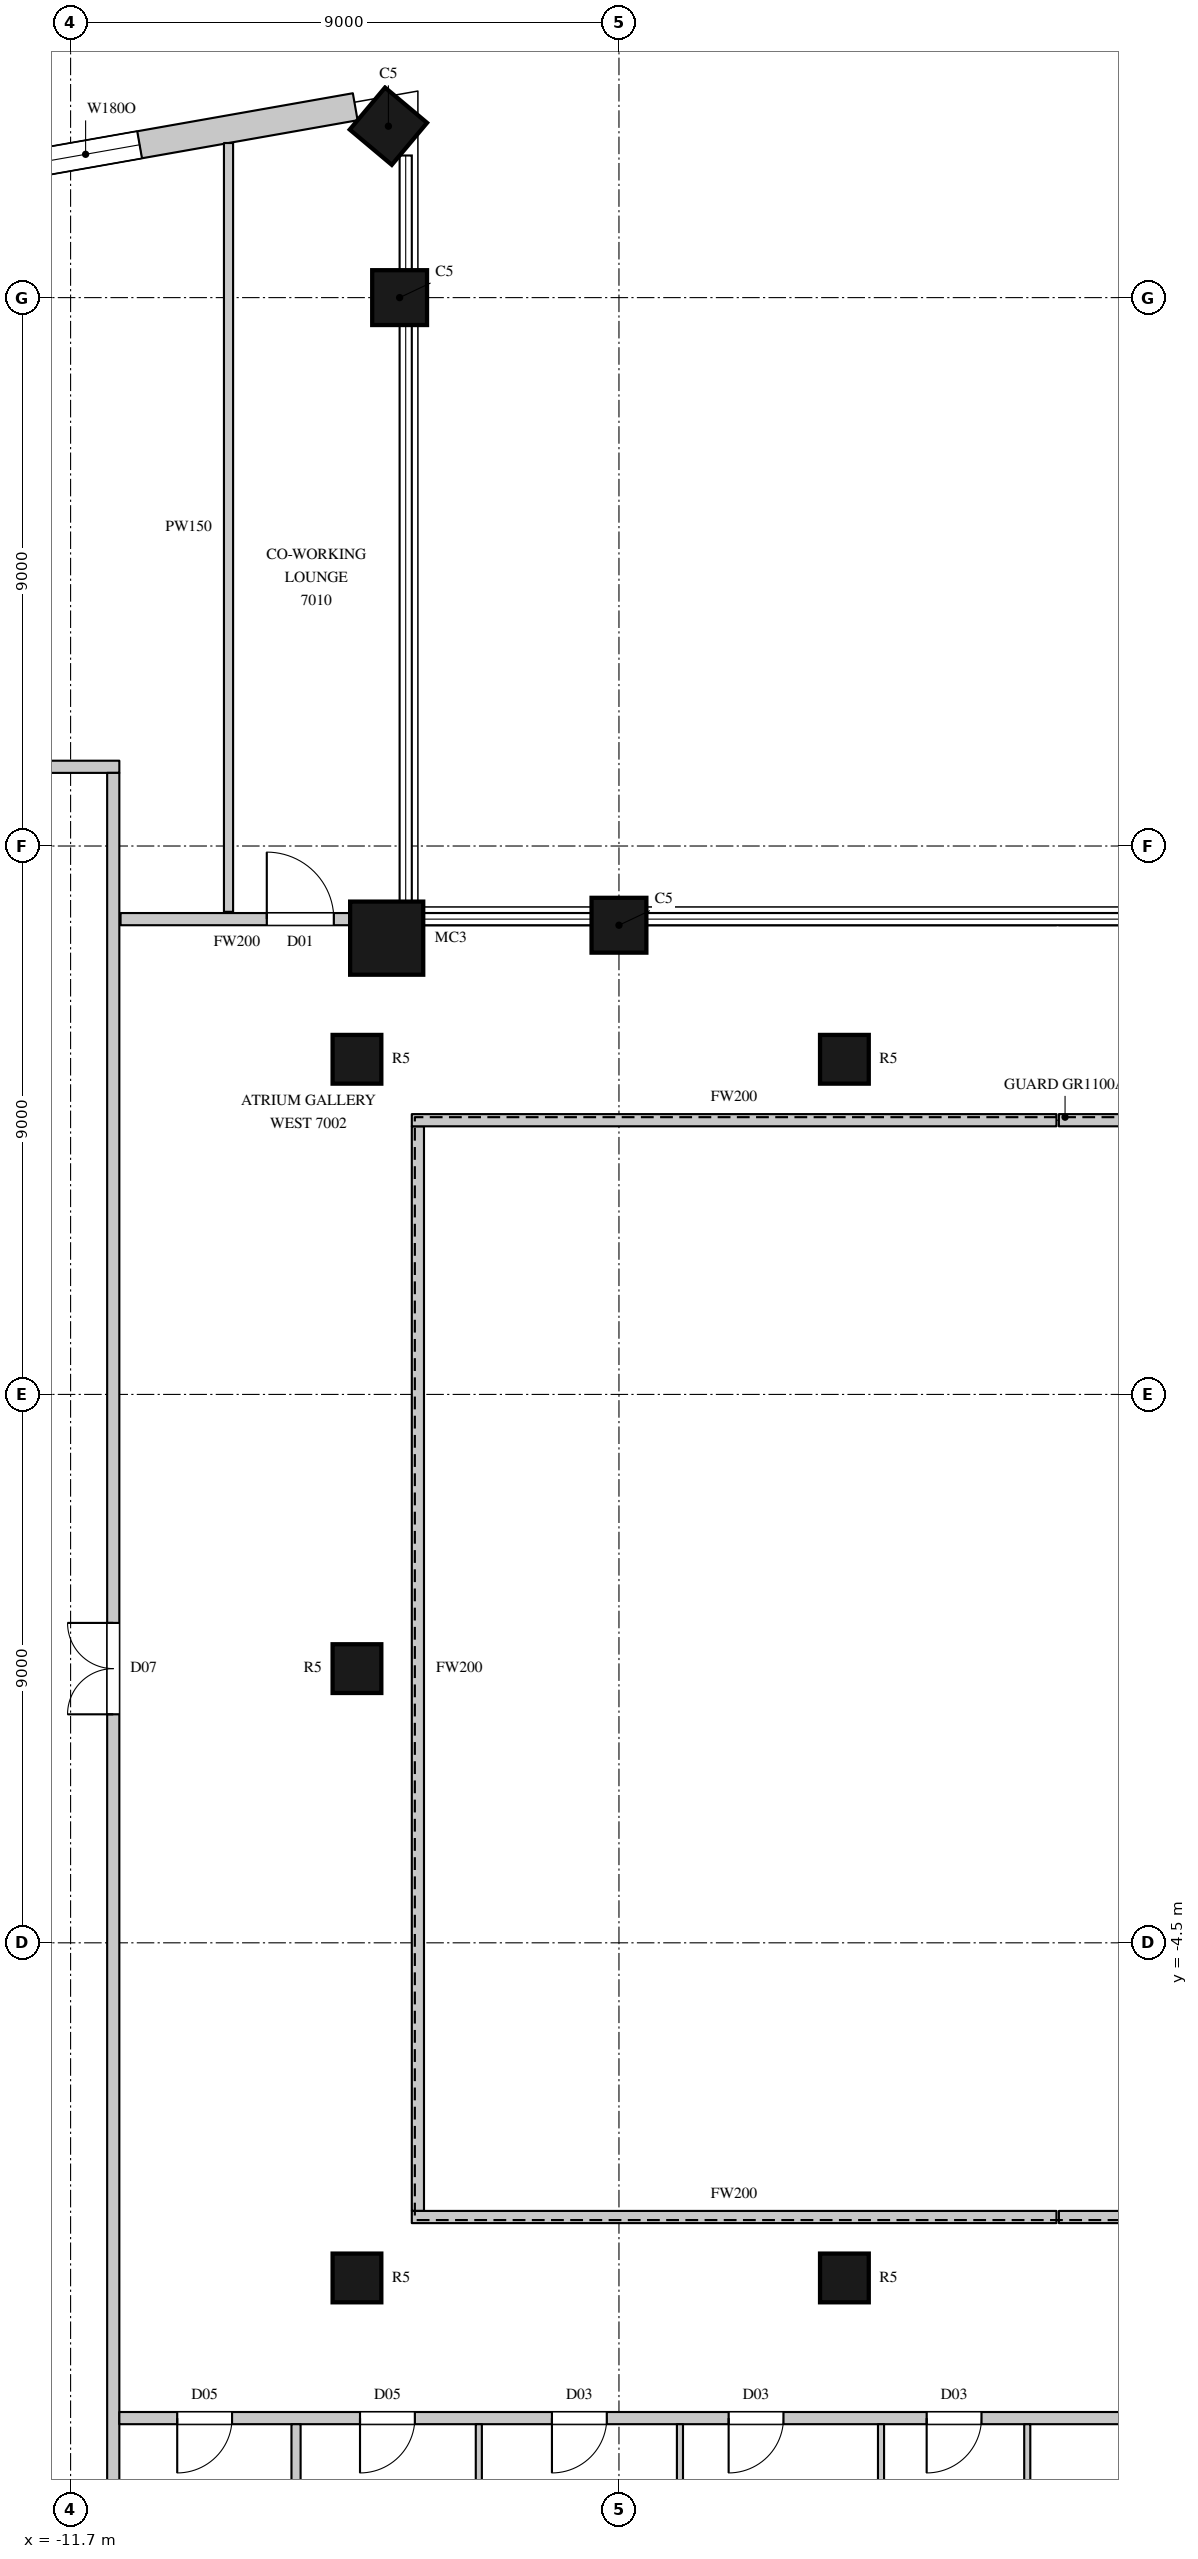
"""IFC4 building model, lengths in metres.
Left out: names, types, materials, properties, quantities, classifications, styles, units other than length and angle.
Written with IfcOpenShell. Run it as: python <this file> out.ifc"""

import sys

from ifc_helpers import new_model, si_unit, direction, frame, frame_2d, origin, origin_2d, place, context, subcontext, project, spatial, rectangle, circle, extrude, element, fill, save


model = new_model("IFC4")
c1 = context("Model", 3, precision=1e-05, world=origin(), true_north=direction((0.0, 1.0)))
c2 = subcontext(c1, "Body", "Model", "MODEL_VIEW")
j1 = project(units=[si_unit("LENGTHUNIT", "METRE"), si_unit("PLANEANGLEUNIT", "RADIAN")], contexts=[c1])
p1 = place(None, origin())
s1 = spatial("IfcSite", under=j1, at=p1, CompositionType="ELEMENT")
p2 = place(p1, origin())
s2 = spatial("IfcBuilding", under=s1, at=p2, CompositionType="ELEMENT")
p3 = place(p2, frame((0.0, 0.0, 309.0)))
s3 = spatial("IfcBuildingStorey", under=s2, at=p3, CompositionType="ELEMENT", Elevation=309.0)
p4 = place(p3, frame((-2.7, 12.2, 0.0), z_axis=(0.0, 0.0, 1.0), x_axis=(-1.0, 0.0, 0.0)))
e1 = element("IfcColumn", 1, at=p4, inside=s3, PredefinedType="COLUMN", context=c2, shape_type="SweptSolid", body=[
    extrude(rectangle(XDim=0.9, YDim=0.9, at=origin_2d()), origin(), (0.0, 0.0, 1.0), 4.1),
])
p5 = place(p3, frame((-6.512, 11.988, 0.0), z_axis=(0.0, 0.0, 1.0), x_axis=(1.0, 0.0, 0.0)))
e2 = element("IfcColumn", 2, at=p5, inside=s3, PredefinedType="COLUMN", context=c2, shape_type="SweptSolid", body=[
    extrude(circle(Radius=0.6, at=origin_2d()), origin(), (0.0, 0.0, 1.0), 4.1),
])
for number, where, z_axis, x_axis in (
    (3, (-6.3, 22.5, 0.0), (0.0, 0.0, 1.0), (0.0, 1.0, 0.0)),
    (4, (-6.484, 25.313, 0.0), (0.0, 0.0, 1.0), (-0.766, 0.643, 0.0)),
):
    element("IfcColumn", number, at=place(p3, frame(where, z_axis=z_axis, x_axis=x_axis)), inside=s3, PredefinedType="COLUMN", context=c2, shape_type="SweptSolid", body=[
        extrude(rectangle(XDim=0.9, YDim=0.9, at=origin_2d()), origin(), (0.0, 0.0, 1.0), 4.1),
    ])
for number, where, z_axis, x_axis in (
    (5, (-7.0, -10.0, 0.0), (0.0, 0.0, 1.0), (1.0, 0.0, 0.0)),
    (6, (-7.0, 0.0, 0.0), (0.0, 0.0, 1.0), (1.0, 0.0, 0.0)),
    (7, (-7.0, 10.0, 0.0), (0.0, 0.0, 1.0), (1.0, 0.0, 0.0)),
    (8, (1.0, -10.0, 0.0), (0.0, 0.0, 1.0), (1.0, 0.0, 0.0)),
    (9, (1.0, 10.0, 0.0), (0.0, 0.0, 1.0), (1.0, 0.0, 0.0)),
):
    element("IfcColumn", number, at=place(p3, frame(where, z_axis=z_axis, x_axis=x_axis)), inside=s3, PredefinedType="COLUMN", context=c2, shape_type="SweptSolid", body=[
        extrude(circle(Radius=0.4, at=origin_2d()), origin(), (0.0, 0.0, 1.0), 4.1),
    ])
p6 = place(p3, frame((-7.029, 25.632, 0.0), z_axis=(0.0, 0.0, 1.0), x_axis=(-0.984797606634, -0.173705710808, 0.0)))
e10 = element("IfcWall", 10, at=p6, inside=s3, PredefinedType="SOLIDWALL", context=c2, shape_type="SweptSolid", body=[
    extrude(rectangle(XDim=5.772, YDim=0.45, at=frame_2d((2.886, 0.0))), origin(), (0.0, 0.0, 1.0), 3.8),
])
p7 = place(p6, frame((3.593, 0.0, 1.05)))
e11 = element("IfcOpeningElement", 11, at=p7, cuts=e10, PredefinedType="OPENING", context=c2, shape_type="SweptSolid", body=[
    extrude(rectangle(XDim=1.8, YDim=2.4, at=frame_2d((0.9, 1.2))), frame((0.0, 0.235, 0.0), z_axis=(0.0, -1.0, 0.0), x_axis=(1.0, 0.0, 0.0)), (0.0, 0.0, 1.0), 0.47),
])
p8 = place(p3, frame((-13.97, 14.8, 0.0), z_axis=(0.0, 0.0, 1.0), x_axis=(1.0, 0.0, 0.0)))
e12 = element("IfcWall", 12, at=p8, inside=s3, PredefinedType="PARTITIONING", context=c2, shape_type="SweptSolid", body=[
    extrude(rectangle(XDim=3.07, YDim=0.2, at=frame_2d((1.535, 0.0))), origin(), (0.0, 0.0, 1.0), 3.8),
])
p9 = place(p3, frame((-11.0, -14.8, 0.0), z_axis=(0.0, 0.0, 1.0), x_axis=(0.0, 1.0, 0.0)))
e13 = element("IfcWall", 13, at=p9, inside=s3, PredefinedType="PARTITIONING", context=c2, shape_type="SweptSolid", body=[
    extrude(rectangle(XDim=29.5, YDim=0.2, at=frame_2d((14.75, 0.0))), origin(), (0.0, 0.0, 1.0), 3.8),
])
p10 = place(p9, frame((14.05, 0.0, 0.0)))
e14 = element("IfcOpeningElement", 14, at=p10, cuts=e13, PredefinedType="OPENING", context=c2, shape_type="SweptSolid", body=[
    extrude(rectangle(XDim=1.5, YDim=2.4, at=frame_2d((0.75, 1.2))), frame((0.0, 0.11, 0.0), z_axis=(0.0, -1.0, 0.0), x_axis=(1.0, 0.0, 0.0)), (0.0, 0.0, 1.0), 0.22),
])
p11 = place(p3, frame((-10.9, -12.3, 0.0), z_axis=(0.0, 0.0, 1.0), x_axis=(1.0, 0.0, 0.0)))
e15 = element("IfcWall", 15, at=p11, inside=s3, PredefinedType="PARTITIONING", context=c2, shape_type="SweptSolid", body=[
    extrude(rectangle(XDim=22.1, YDim=0.2, at=frame_2d((11.05, 0.0))), origin(), (0.0, 0.0, 1.0), 3.8),
])
p12 = place(p11, frame((0.95, 0.0, 0.0)))
e16 = element("IfcOpeningElement", 16, at=p12, cuts=e15, PredefinedType="OPENING", context=c2, shape_type="SweptSolid", body=[
    extrude(rectangle(XDim=0.9, YDim=2.2, at=frame_2d((0.45, 1.1))), frame((0.0, 0.11, 0.0), z_axis=(0.0, -1.0, 0.0), x_axis=(1.0, 0.0, 0.0)), (0.0, 0.0, 1.0), 0.22),
])
p13 = place(p11, frame((3.95, 0.0, 0.0)))
e17 = element("IfcOpeningElement", 17, at=p13, cuts=e15, PredefinedType="OPENING", context=c2, shape_type="SweptSolid", body=[
    extrude(rectangle(XDim=0.9, YDim=2.2, at=frame_2d((0.45, 1.1))), frame((0.0, 0.11, 0.0), z_axis=(0.0, -1.0, 0.0), x_axis=(1.0, 0.0, 0.0)), (0.0, 0.0, 1.0), 0.22),
])
p14 = place(p11, frame((7.1, 0.0, 0.0)))
e18 = element("IfcOpeningElement", 18, at=p14, cuts=e15, PredefinedType="OPENING", context=c2, shape_type="SweptSolid", body=[
    extrude(rectangle(XDim=0.9, YDim=2.2, at=frame_2d((0.45, 1.1))), frame((0.0, 0.11, 0.0), z_axis=(0.0, -1.0, 0.0), x_axis=(1.0, 0.0, 0.0)), (0.0, 0.0, 1.0), 0.22),
])
p15 = place(p11, frame((10.0, 0.0, 0.0)))
e19 = element("IfcOpeningElement", 19, at=p15, cuts=e15, PredefinedType="OPENING", context=c2, shape_type="SweptSolid", body=[
    extrude(rectangle(XDim=0.9, YDim=2.2, at=frame_2d((0.45, 1.1))), frame((0.0, 0.11, 0.0), z_axis=(0.0, -1.0, 0.0), x_axis=(1.0, 0.0, 0.0)), (0.0, 0.0, 1.0), 0.22),
])
p16 = place(p11, frame((13.25, 0.0, 0.0)))
e20 = element("IfcOpeningElement", 20, at=p16, cuts=e15, PredefinedType="OPENING", context=c2, shape_type="SweptSolid", body=[
    extrude(rectangle(XDim=0.9, YDim=2.2, at=frame_2d((0.45, 1.1))), frame((0.0, 0.11, 0.0), z_axis=(0.0, -1.0, 0.0), x_axis=(1.0, 0.0, 0.0)), (0.0, 0.0, 1.0), 0.22),
])
p17 = place(p11, frame((16.85, 0.0, 0.0)))
e21 = element("IfcOpeningElement", 21, at=p17, cuts=e15, PredefinedType="OPENING", context=c2, shape_type="SweptSolid", body=[
    extrude(rectangle(XDim=1.1, YDim=2.4, at=frame_2d((0.55, 1.2))), frame((0.0, 0.11, 0.0), z_axis=(0.0, -1.0, 0.0), x_axis=(1.0, 0.0, 0.0)), (0.0, 0.0, 1.0), 0.22),
])
p18 = place(p3, frame((-10.88, 12.3, 0.0), z_axis=(0.0, 0.0, 1.0), x_axis=(1.0, 0.0, 0.0)))
e22 = element("IfcWall", 22, at=p18, inside=s3, PredefinedType="PARTITIONING", context=c2, shape_type="SweptSolid", body=[
    extrude(rectangle(XDim=3.818, YDim=0.2, at=frame_2d((1.909, 0.0))), origin(), (0.0, 0.0, 1.0), 3.8),
])
p19 = place(p18, frame((2.4, 0.0, 0.0)))
e23 = element("IfcOpeningElement", 23, at=p19, cuts=e22, PredefinedType="OPENING", context=c2, shape_type="SweptSolid", body=[
    extrude(rectangle(XDim=1.1, YDim=2.4, at=frame_2d((0.55, 1.2))), frame((0.0, 0.11, 0.0), z_axis=(0.0, -1.0, 0.0), x_axis=(1.0, 0.0, 0.0)), (0.0, 0.0, 1.0), 0.22),
])
p20 = place(p3, frame((-5.962, 12.3, 0.0), z_axis=(0.0, 0.0, 1.0), x_axis=(1.0, 0.0, 0.0)))
e24 = element("IfcWall", 24, at=p20, inside=s3, PredefinedType="PARTITIONING", context=c2, shape_type="SweptSolid", body=[
    extrude(rectangle(XDim=2.812, YDim=0.2, at=frame_2d((1.406, 0.0))), origin(), (0.0, 0.0, 1.0), 3.8),
])
p21 = place(p3, frame((-2.25, 12.3, 0.0), z_axis=(0.0, 0.0, 1.0), x_axis=(1.0, 0.0, 0.0)))
e25 = element("IfcWall", 25, at=p21, inside=s3, PredefinedType="PARTITIONING", context=c2, shape_type="SweptSolid", body=[
    extrude(rectangle(XDim=6.73, YDim=0.2, at=frame_2d((3.365, 0.0))), origin(), (0.0, 0.0, 1.0), 3.8),
])
p22 = place(p3, frame((-6.0, -8.9, 0.0), z_axis=(0.0, 0.0, 1.0), x_axis=(0.0, 1.0, 0.0)))
e26 = element("IfcWall", 26, at=p22, inside=s3, PredefinedType="PARTITIONING", context=c2, shape_type="SweptSolid", body=[
    extrude(rectangle(XDim=17.8, YDim=0.2, at=frame_2d((8.9, 0.0))), origin(), (0.0, 0.0, 1.0), 3.8),
])
for number, where, z_axis, x_axis in (
    (27, (-6.1, -9.0, 0.0), (0.0, 0.0, 1.0), (1.0, 0.0, 0.0)),
    (28, (-6.1, 9.0, 0.0), (0.0, 0.0, 1.0), (1.0, 0.0, 0.0)),
):
    element("IfcWall", number, at=place(p3, frame(where, z_axis=z_axis, x_axis=x_axis)), inside=s3, PredefinedType="PARTITIONING", context=c2, shape_type="SweptSolid", body=[
        extrude(rectangle(XDim=10.58, YDim=0.2, at=frame_2d((5.29, 0.0))), origin(), (0.0, 0.0, 1.0), 3.8),
    ])
for number, where, z_axis, x_axis in (
    (29, (4.52, -9.0, 0.0), (0.0, 0.0, 1.0), (1.0, 0.0, 0.0)),
    (30, (4.52, 9.0, 0.0), (0.0, 0.0, 1.0), (1.0, 0.0, 0.0)),
):
    element("IfcWall", number, at=place(p3, frame(where, z_axis=z_axis, x_axis=x_axis)), inside=s3, PredefinedType="PARTITIONING", context=c2, shape_type="SweptSolid", body=[
        extrude(rectangle(XDim=3.58, YDim=0.2, at=frame_2d((1.79, 0.0))), origin(), (0.0, 0.0, 1.0), 3.8),
    ])
p23 = place(p3, frame((4.52, 12.3, 0.0), z_axis=(0.0, 0.0, 1.0), x_axis=(1.0, 0.0, 0.0)))
e31 = element("IfcWall", 31, at=p23, inside=s3, PredefinedType="PARTITIONING", context=c2, shape_type="SweptSolid", body=[
    extrude(rectangle(XDim=1.33, YDim=0.2, at=frame_2d((0.665, 0.0))), origin(), (0.0, 0.0, 1.0), 3.8),
])
p24 = place(p3, frame((-9.108, 12.42, 0.0), z_axis=(0.0, 0.0, 1.0), x_axis=(0.0, 1.0, 0.0)))
e32 = element("IfcWall", 32, at=p24, inside=s3, PredefinedType="PARTITIONING", context=c2, shape_type="SweptSolid", body=[
    extrude(rectangle(XDim=12.617, YDim=0.15, at=frame_2d((6.309, 0.0))), origin(), (0.0, 0.0, 1.0), 3.8),
])
p25 = place(p3, frame((-8.0, -24.04, 0.0), z_axis=(0.0, 0.0, 1.0), x_axis=(0.0, 1.0, 0.0)))
e33 = element("IfcWall", 33, at=p25, inside=s3, PredefinedType="PARTITIONING", context=c2, shape_type="SweptSolid", body=[
    extrude(rectangle(XDim=11.64, YDim=0.15, at=frame_2d((5.82, 0.0))), origin(), (0.0, 0.0, 1.0), 3.8),
])
p26 = place(p3, frame((-5.0, -24.04, 0.0), z_axis=(0.0, 0.0, 1.0), x_axis=(0.0, 1.0, 0.0)))
e34 = element("IfcWall", 34, at=p26, inside=s3, PredefinedType="PARTITIONING", context=c2, shape_type="SweptSolid", body=[
    extrude(rectangle(XDim=11.64, YDim=0.1, at=frame_2d((5.82, 0.0))), origin(), (0.0, 0.0, 1.0), 3.8),
])
p27 = place(p3, frame((-1.699, -23.522, 0.0), z_axis=(0.0, 0.0, 1.0), x_axis=(0.0, 1.0, 0.0)))
e35 = element("IfcWall", 35, at=p27, inside=s3, PredefinedType="PARTITIONING", context=c2, shape_type="SweptSolid", body=[
    extrude(rectangle(XDim=11.122, YDim=0.1, at=frame_2d((5.561, 0.0))), origin(), (0.0, 0.0, 1.0), 3.8),
])
p28 = place(p3, frame((1.601, -23.412, 0.0), z_axis=(0.0, 0.0, 1.0), x_axis=(0.0, 1.0, 0.0)))
e36 = element("IfcWall", 36, at=p28, inside=s3, PredefinedType="PARTITIONING", context=c2, shape_type="SweptSolid", body=[
    extrude(rectangle(XDim=11.012, YDim=0.1, at=frame_2d((5.506, 0.0))), origin(), (0.0, 0.0, 1.0), 3.8),
])
p29 = place(p3, frame((4.001, -22.999, 0.0), z_axis=(0.0, 0.0, 1.0), x_axis=(0.0, 1.0, 0.0)))
e37 = element("IfcWall", 37, at=p29, inside=s3, PredefinedType="PARTITIONING", context=c2, shape_type="SweptSolid", body=[
    extrude(rectangle(XDim=10.599, YDim=0.1, at=frame_2d((5.3, 0.0))), origin(), (0.0, 0.0, 1.0), 3.8),
])
p30 = place(p7, origin())
e38 = element("IfcWindow", 38, at=p30, inside=s3, PartitioningType="SINGLE_PANEL", PredefinedType="WINDOW", context=c2, shape_type="SweptSolid", body=[
    extrude(rectangle(XDim=1.8, YDim=2.4, at=frame_2d((0.9, 1.2))), frame((0.0, 0.135, 0.0), z_axis=(0.0, -1.0, 0.0), x_axis=(1.0, 0.0, 0.0)), (0.0, 0.0, 1.0), 0.06),
])
fill(e11, e38)
p31 = place(p10, origin())
e39 = element("IfcDoor", 39, at=p31, inside=s3, OperationType="DOUBLE_DOOR_SINGLE_SWING", PredefinedType="DOOR", context=c2, shape_type="SweptSolid", body=[
    extrude(rectangle(XDim=1.5, YDim=2.4, at=frame_2d((0.75, 1.2))), frame((0.0, 0.025, 0.0), z_axis=(0.0, -1.0, 0.0), x_axis=(1.0, 0.0, 0.0)), (0.0, 0.0, 1.0), 0.05),
])
fill(e14, e39)
p32 = place(p12, origin())
e40 = element("IfcDoor", 40, at=p32, inside=s3, OperationType="SINGLE_SWING_RIGHT", PredefinedType="DOOR", context=c2, shape_type="SweptSolid", body=[
    extrude(rectangle(XDim=0.9, YDim=2.2, at=frame_2d((0.45, 1.1))), frame((0.0, 0.025, 0.0), z_axis=(0.0, -1.0, 0.0), x_axis=(1.0, 0.0, 0.0)), (0.0, 0.0, 1.0), 0.05),
])
fill(e16, e40)
p33 = place(p13, origin())
e41 = element("IfcDoor", 41, at=p33, inside=s3, OperationType="SINGLE_SWING_RIGHT", PredefinedType="DOOR", context=c2, shape_type="SweptSolid", body=[
    extrude(rectangle(XDim=0.9, YDim=2.2, at=frame_2d((0.45, 1.1))), frame((0.0, 0.025, 0.0), z_axis=(0.0, -1.0, 0.0), x_axis=(1.0, 0.0, 0.0)), (0.0, 0.0, 1.0), 0.05),
])
fill(e17, e41)
p34 = place(p14, origin())
e42 = element("IfcDoor", 42, at=p34, inside=s3, OperationType="SINGLE_SWING_RIGHT", PredefinedType="DOOR", context=c2, shape_type="SweptSolid", body=[
    extrude(rectangle(XDim=0.9, YDim=2.2, at=frame_2d((0.45, 1.1))), frame((0.0, 0.025, 0.0), z_axis=(0.0, -1.0, 0.0), x_axis=(1.0, 0.0, 0.0)), (0.0, 0.0, 1.0), 0.05),
])
fill(e18, e42)
p35 = place(p15, origin())
e43 = element("IfcDoor", 43, at=p35, inside=s3, OperationType="SINGLE_SWING_RIGHT", PredefinedType="DOOR", context=c2, shape_type="SweptSolid", body=[
    extrude(rectangle(XDim=0.9, YDim=2.2, at=frame_2d((0.45, 1.1))), frame((0.0, 0.025, 0.0), z_axis=(0.0, -1.0, 0.0), x_axis=(1.0, 0.0, 0.0)), (0.0, 0.0, 1.0), 0.05),
])
fill(e19, e43)
p36 = place(p16, origin())
e44 = element("IfcDoor", 44, at=p36, inside=s3, OperationType="SINGLE_SWING_RIGHT", PredefinedType="DOOR", context=c2, shape_type="SweptSolid", body=[
    extrude(rectangle(XDim=0.9, YDim=2.2, at=frame_2d((0.45, 1.1))), frame((0.0, 0.025, 0.0), z_axis=(0.0, -1.0, 0.0), x_axis=(1.0, 0.0, 0.0)), (0.0, 0.0, 1.0), 0.05),
])
fill(e20, e44)
p37 = place(p19, origin())
e45 = element("IfcDoor", 45, at=p37, inside=s3, OperationType="SINGLE_SWING_LEFT", PredefinedType="DOOR", context=c2, shape_type="SweptSolid", body=[
    extrude(rectangle(XDim=1.1, YDim=2.4, at=frame_2d((0.55, 1.2))), frame((0.0, 0.025, 0.0), z_axis=(0.0, -1.0, 0.0), x_axis=(1.0, 0.0, 0.0)), (0.0, 0.0, 1.0), 0.05),
])
fill(e23, e45)
save(model, sys.argv[1])
